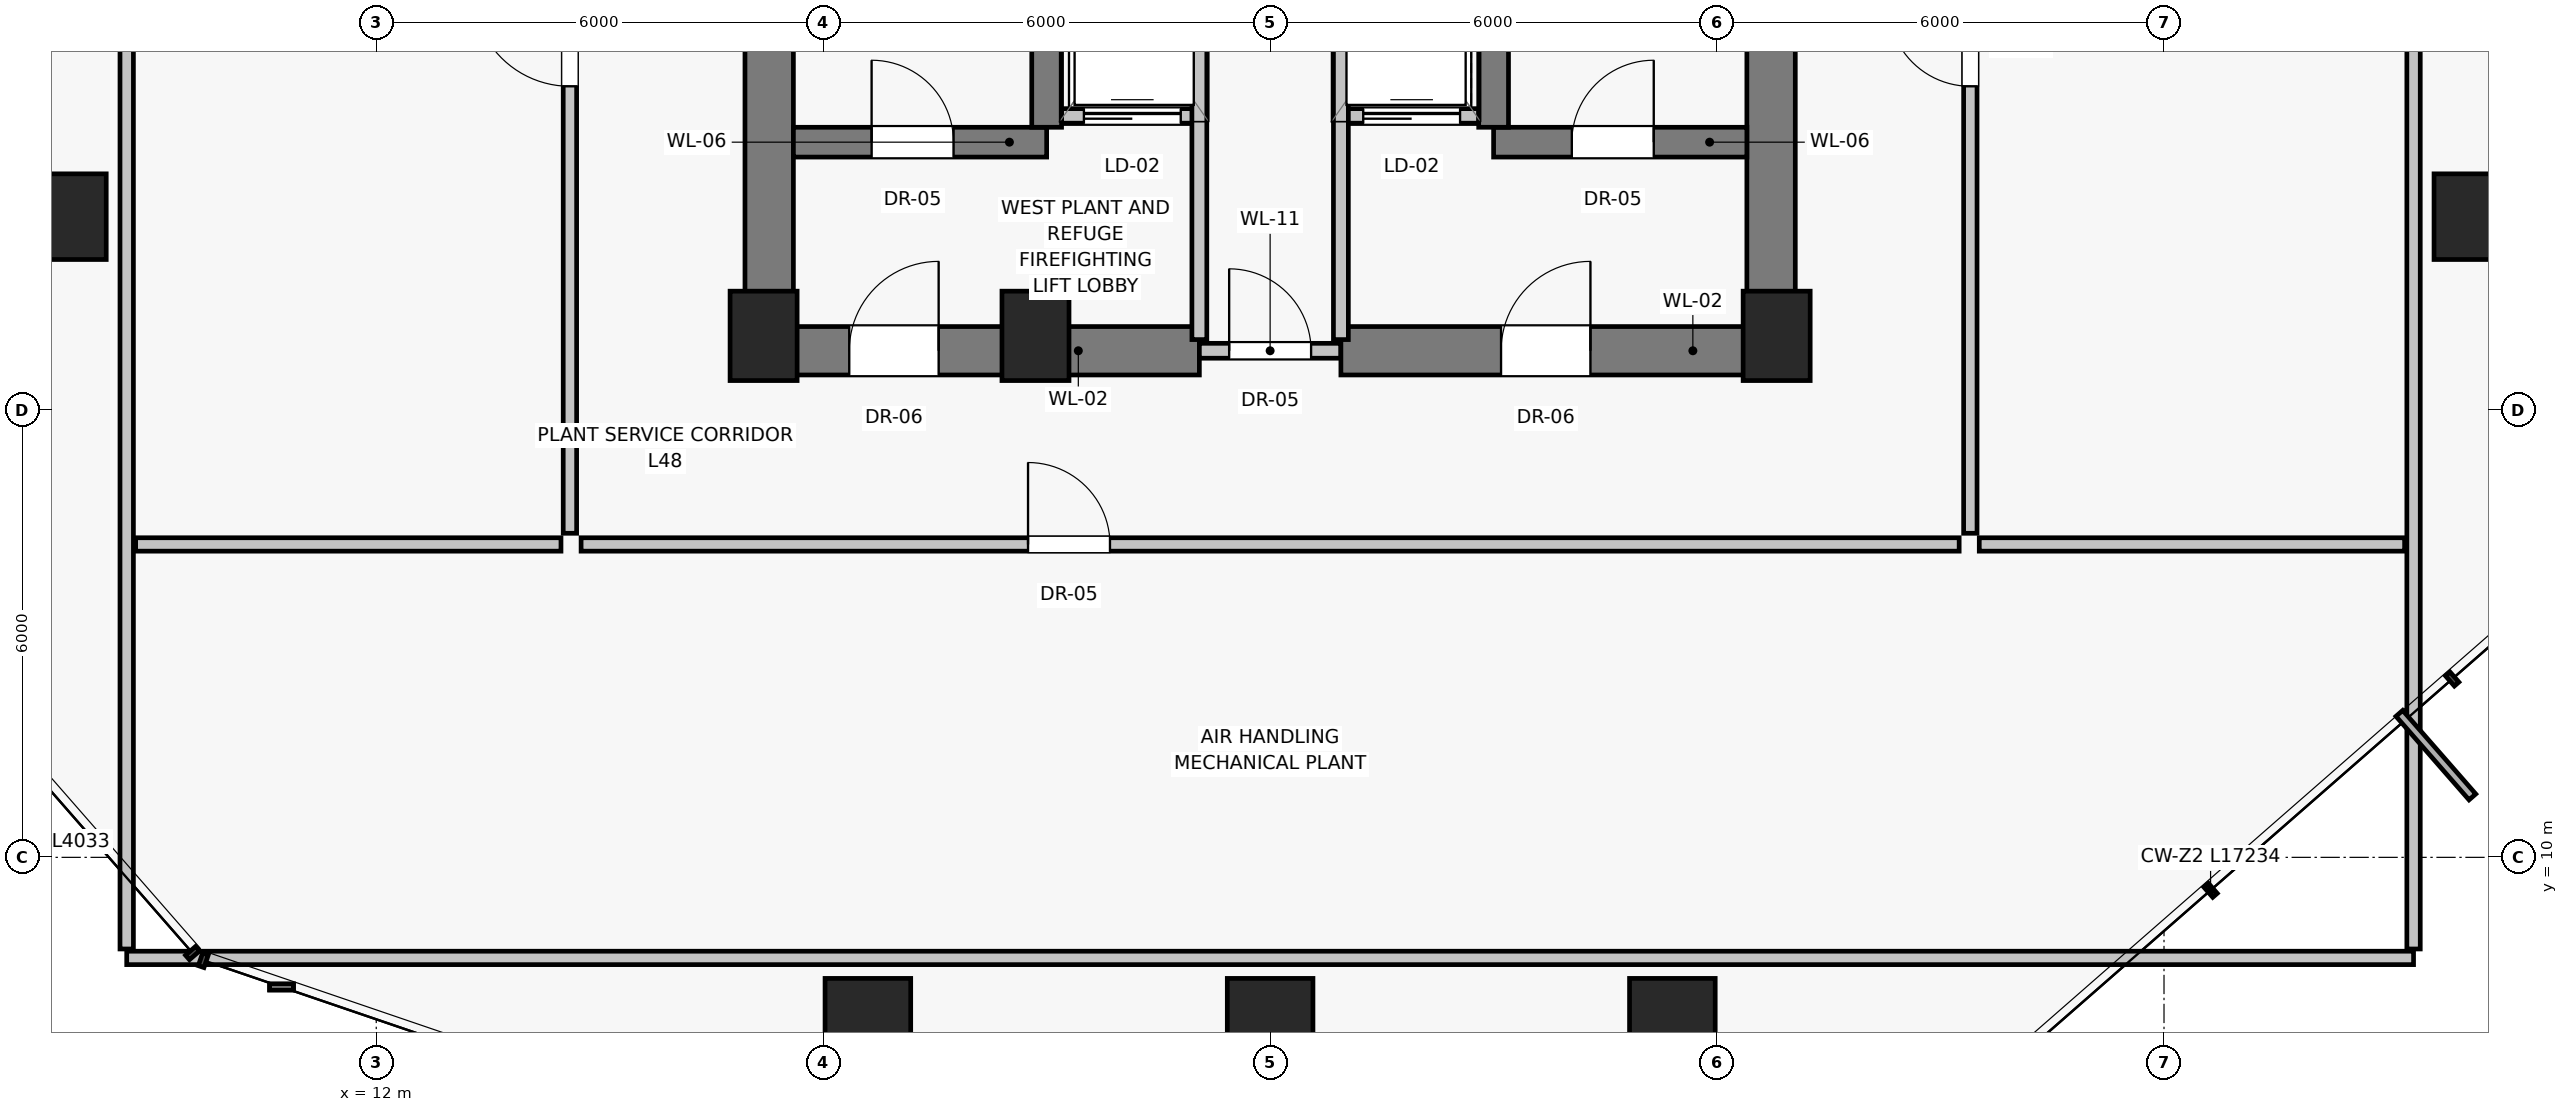
"""IFC4 building model, lengths in metres.
Left out: names, types, materials, properties, quantities, classifications, styles, units other than length and angle.
Written with IfcOpenShell. Run it as: python <this file> out.ifc"""

import sys

from ifc_helpers import new_model, si_unit, direction, frame, frame_2d, origin, origin_2d, place, context, subcontext, project, spatial, rectangle, extrude, source, transform, mapped, element, fill, save


model = new_model("IFC4")
c1 = context("Model", 3, precision=1e-05, world=origin(), true_north=direction((0.0, 1.0)))
c2 = subcontext(c1, "Body", "Model", "MODEL_VIEW")
j1 = project(units=[si_unit("LENGTHUNIT", "METRE"), si_unit("PLANEANGLEUNIT", "RADIAN")], contexts=[c1])
p1 = place(None, origin())
s1 = spatial("IfcSite", under=j1, at=p1, CompositionType="ELEMENT")
p2 = place(p1, origin())
s2 = spatial("IfcBuilding", under=s1, at=p2, CompositionType="ELEMENT")
p3 = place(p2, frame((0.0, 0.0, 169.55)))
s3 = spatial("IfcBuildingStorey", under=s2, at=p3, CompositionType="ELEMENT", Elevation=169.55)
for number, where, z_axis, x_axis in (
    (1, (17.2, 17.0, 0.0), (0.0, 0.0, 1.0), (1.0, 0.0, 0.0)),
    (2, (20.85, 17.0, 0.0), (0.0, 0.0, 1.0), (1.0, 0.0, 0.0)),
    (3, (30.8, 17.0, 0.0), (0.0, 0.0, 1.0), (1.0, 0.0, 0.0)),
):
    element("IfcColumn", number, at=place(p3, frame(where, z_axis=z_axis, x_axis=x_axis)), inside=s3, PredefinedType="PILASTER", context=c2, shape_type="SweptSolid", body=[
        extrude(rectangle(XDim=0.9, YDim=1.2, at=origin_2d()), origin(), (0.0, 0.0, 1.0), 4.8),
    ])
for number, where, z_axis, x_axis in (
    (4, (40.2, 18.6, 0.0), (0.0, 0.0, 1.0), (1.0, 0.0, 0.0)),
    (5, (7.8, 18.6, 0.0), (0.0, 0.0, 1.0), (1.0, 0.0, 0.0)),
    (6, (18.6, 7.8, 0.0), (0.0, 0.0, 1.0), (1.0, 0.0, 0.0)),
    (7, (24.0, 7.8, 0.0), (0.0, 0.0, 1.0), (1.0, 0.0, 0.0)),
    (8, (29.4, 7.8, 0.0), (0.0, 0.0, 1.0), (1.0, 0.0, 0.0)),
):
    element("IfcColumn", number, at=place(p3, frame(where, z_axis=z_axis, x_axis=x_axis)), inside=s3, PredefinedType="COLUMN", context=c2, shape_type="SweptSolid", body=[
        extrude(rectangle(XDim=1.15, YDim=1.15, at=origin_2d()), origin(), (0.0, 0.0, 1.0), 4.8),
    ])
for number, where, z_axis, x_axis in (
    (9, (17.275, 16.8, 0.0), (0.0, 0.0, 1.0), (0.0, 1.0, 0.0)),
    (10, (30.725, 16.8, 0.0), (0.0, 0.0, 1.0), (0.0, 1.0, 0.0)),
):
    element("IfcWall", number, at=place(p3, frame(where, z_axis=z_axis, x_axis=x_axis)), inside=s3, PredefinedType="SHEAR", context=c2, shape_type="SweptSolid", body=[
        extrude(rectangle(XDim=14.2, YDim=0.65, at=frame_2d((7.1, 0.0))), origin(), (0.0, 0.0, 1.0), 4.48),
    ])
p4 = place(p3, frame((17.2, 16.8, 0.0), z_axis=(0.0, 0.0, 1.0), x_axis=(1.0, 0.0, 0.0)))
e11 = element("IfcWall", 11, at=p4, inside=s3, PredefinedType="SHEAR", context=c2, shape_type="SweptSolid", body=[
    extrude(rectangle(XDim=5.85, YDim=0.65, at=frame_2d((2.925, 0.0))), origin(), (0.0, 0.0, 1.0), 4.48),
])
p5 = place(p4, frame((1.15, 0.0, 0.0)))
e12 = element("IfcOpeningElement", 12, at=p5, cuts=e11, PredefinedType="OPENING", context=c2, shape_type="SweptSolid", body=[
    extrude(rectangle(XDim=1.2, YDim=2.03, at=frame_2d((0.6, 1.015))), frame((0.0, 0.335, 0.0), z_axis=(0.0, -1.0, 0.0), x_axis=(1.0, 0.0, 0.0)), (0.0, 0.0, 1.0), 0.67),
])
p6 = place(p3, frame((23.05, 16.8, 0.0), z_axis=(0.0, 0.0, 1.0), x_axis=(1.0, 0.0, 0.0)))
e13 = element("IfcWall", 13, at=p6, inside=s3, PredefinedType="SOLIDWALL", context=c2, shape_type="SweptSolid", body=[
    extrude(rectangle(XDim=1.9, YDim=0.2, at=frame_2d((0.95, 0.0))), origin(), (0.0, 0.0, 1.0), 2.28),
])
p7 = place(p6, frame((0.4, 0.0, 0.0)))
e14 = element("IfcOpeningElement", 14, at=p7, cuts=e13, PredefinedType="OPENING", context=c2, shape_type="SweptSolid", body=[
    extrude(rectangle(XDim=1.1, YDim=2.03, at=frame_2d((0.55, 1.015))), frame((0.0, 0.11, 0.0), z_axis=(0.0, -1.0, 0.0), x_axis=(1.0, 0.0, 0.0)), (0.0, 0.0, 1.0), 0.22),
])
p8 = place(p3, frame((24.95, 16.8, 0.0), z_axis=(0.0, 0.0, 1.0), x_axis=(1.0, 0.0, 0.0)))
e15 = element("IfcWall", 15, at=p8, inside=s3, PredefinedType="SHEAR", context=c2, shape_type="SweptSolid", body=[
    extrude(rectangle(XDim=5.85, YDim=0.65, at=frame_2d((2.925, 0.0))), origin(), (0.0, 0.0, 1.0), 4.48),
])
p9 = place(p8, frame((2.15, 0.0, 0.0)))
e16 = element("IfcOpeningElement", 16, at=p9, cuts=e15, PredefinedType="OPENING", context=c2, shape_type="SweptSolid", body=[
    extrude(rectangle(XDim=1.2, YDim=2.03, at=frame_2d((0.6, 1.015))), frame((0.0, 0.335, 0.0), z_axis=(0.0, -1.0, 0.0), x_axis=(1.0, 0.0, 0.0)), (0.0, 0.0, 1.0), 0.67),
])
p10 = place(p3, frame((17.6, 19.6, 0.0), z_axis=(0.0, 0.0, 1.0), x_axis=(1.0, 0.0, 0.0)))
e17 = element("IfcWall", 17, at=p10, inside=s3, PredefinedType="SHEAR", context=c2, shape_type="SweptSolid", body=[
    extrude(rectangle(XDim=3.4, YDim=0.4, at=frame_2d((1.7, 0.0))), origin(), (0.0, 0.0, 1.0), 4.48),
])
p11 = place(p10, frame((1.05, 0.0, 0.0)))
e18 = element("IfcOpeningElement", 18, at=p11, cuts=e17, PredefinedType="OPENING", context=c2, shape_type="SweptSolid", body=[
    extrude(rectangle(XDim=1.1, YDim=2.03, at=frame_2d((0.55, 1.015))), frame((0.0, 0.21, 0.0), z_axis=(0.0, -1.0, 0.0), x_axis=(1.0, 0.0, 0.0)), (0.0, 0.0, 1.0), 0.42),
])
p12 = place(p3, frame((21.2, 19.95, 0.0), z_axis=(0.0, 0.0, 1.0), x_axis=(1.0, 0.0, 0.0)))
e19 = element("IfcWall", 19, at=p12, inside=s3, PredefinedType="SOLIDWALL", context=c2, shape_type="SweptSolid", body=[
    extrude(rectangle(XDim=1.85, YDim=0.2, at=frame_2d((0.925, 0.0))), origin(), (0.0, 0.0, 1.0), 4.48),
])
p13 = place(p12, frame((0.3, 0.0, 0.0)))
e20 = element("IfcOpeningElement", 20, at=p13, cuts=e19, PredefinedType="OPENING", context=c2, shape_type="SweptSolid", body=[
    extrude(rectangle(XDim=1.3, YDim=2.25, at=frame_2d((0.65, 1.125))), frame((0.0, 0.11, 0.0), z_axis=(0.0, -1.0, 0.0), x_axis=(1.0, 0.0, 0.0)), (0.0, 0.0, 1.0), 0.22),
])
p14 = place(p3, frame((24.95, 19.95, 0.0), z_axis=(0.0, 0.0, 1.0), x_axis=(1.0, 0.0, 0.0)))
e21 = element("IfcWall", 21, at=p14, inside=s3, PredefinedType="SOLIDWALL", context=c2, shape_type="SweptSolid", body=[
    extrude(rectangle(XDim=1.85, YDim=0.2, at=frame_2d((0.925, 0.0))), origin(), (0.0, 0.0, 1.0), 4.48),
])
p15 = place(p14, frame((0.3, 0.0, 0.0)))
e22 = element("IfcOpeningElement", 22, at=p15, cuts=e21, PredefinedType="OPENING", context=c2, shape_type="SweptSolid", body=[
    extrude(rectangle(XDim=1.3, YDim=2.25, at=frame_2d((0.65, 1.125))), frame((0.0, 0.11, 0.0), z_axis=(0.0, -1.0, 0.0), x_axis=(1.0, 0.0, 0.0)), (0.0, 0.0, 1.0), 0.22),
])
p16 = place(p3, frame((27.0, 19.6, 0.0), z_axis=(0.0, 0.0, 1.0), x_axis=(1.0, 0.0, 0.0)))
e23 = element("IfcWall", 23, at=p16, inside=s3, PredefinedType="SHEAR", context=c2, shape_type="SweptSolid", body=[
    extrude(rectangle(XDim=3.4, YDim=0.4, at=frame_2d((1.7, 0.0))), origin(), (0.0, 0.0, 1.0), 4.48),
])
p17 = place(p16, frame((1.05, 0.0, 0.0)))
e24 = element("IfcOpeningElement", 24, at=p17, cuts=e23, PredefinedType="OPENING", context=c2, shape_type="SweptSolid", body=[
    extrude(rectangle(XDim=1.1, YDim=2.03, at=frame_2d((0.55, 1.015))), frame((0.0, 0.21, 0.0), z_axis=(0.0, -1.0, 0.0), x_axis=(1.0, 0.0, 0.0)), (0.0, 0.0, 1.0), 0.42),
])
for number, where, z_axis, x_axis in (
    (25, (21.0, 19.8, 0.0), (0.0, 0.0, 1.0), (0.0, 1.0, 0.0)),
    (26, (27.0, 19.8, 0.0), (0.0, 0.0, 1.0), (0.0, 1.0, 0.0)),
):
    element("IfcWall", number, at=place(p3, frame(where, z_axis=z_axis, x_axis=x_axis)), inside=s3, PredefinedType="SHEAR", context=c2, shape_type="SweptSolid", body=[
        extrude(rectangle(XDim=8.8, YDim=0.4, at=frame_2d((4.4, 0.0))), origin(), (0.0, 0.0, 1.0), 4.48),
    ])
for number, where, z_axis, x_axis in (
    (27, (23.05, 16.95, 0.0), (0.0, 0.0, 1.0), (0.0, 1.0, 0.0)),
    (28, (24.95, 16.95, 0.0), (0.0, 0.0, 1.0), (0.0, 1.0, 0.0)),
):
    element("IfcWall", number, at=place(p3, frame(where, z_axis=z_axis, x_axis=x_axis)), inside=s3, PredefinedType="SOLIDWALL", context=c2, shape_type="SweptSolid", body=[
        extrude(rectangle(XDim=5.6, YDim=0.2, at=frame_2d((2.8, 0.0))), origin(), (0.0, 0.0, 1.0), 2.28),
    ])
p18 = place(p3, frame((14.75, 14.2, 0.0), z_axis=(0.0, 0.0, 1.0), x_axis=(1.0, 0.0, 0.0)))
e29 = element("IfcWall", 29, at=p18, inside=s3, PredefinedType="PARTITIONING", context=c2, shape_type="SweptSolid", body=[
    extrude(rectangle(XDim=18.5, YDim=0.18, at=frame_2d((9.25, 0.0))), origin(), (0.0, 0.0, 1.0), 4.48),
])
p19 = place(p18, frame((6.0, 0.0, 0.0)))
e30 = element("IfcOpeningElement", 30, at=p19, cuts=e29, PredefinedType="OPENING", context=c2, shape_type="SweptSolid", body=[
    extrude(rectangle(XDim=1.1, YDim=2.03, at=frame_2d((0.55, 1.015))), frame((0.0, 0.1, 0.0), z_axis=(0.0, -1.0, 0.0), x_axis=(1.0, 0.0, 0.0)), (0.0, 0.0, 1.0), 0.2),
])
p20 = place(p3, frame((33.4, 14.35, 0.0), z_axis=(0.0, 0.0, 1.0), x_axis=(0.0, 1.0, 0.0)))
e31 = element("IfcWall", 31, at=p20, inside=s3, PredefinedType="PARTITIONING", context=c2, shape_type="SweptSolid", body=[
    extrude(rectangle(XDim=19.1, YDim=0.18, at=frame_2d((9.55, 0.0))), origin(), (0.0, 0.0, 1.0), 4.48),
])
p21 = place(p20, frame((6.0, 0.0, 0.0)))
e32 = element("IfcOpeningElement", 32, at=p21, cuts=e31, PredefinedType="OPENING", context=c2, shape_type="SweptSolid", body=[
    extrude(rectangle(XDim=1.1, YDim=2.03, at=frame_2d((0.55, 1.015))), frame((0.0, 0.1, 0.0), z_axis=(0.0, -1.0, 0.0), x_axis=(1.0, 0.0, 0.0)), (0.0, 0.0, 1.0), 0.2),
])
p22 = place(p3, frame((14.6, 14.35, 0.0), z_axis=(0.0, 0.0, 1.0), x_axis=(0.0, 1.0, 0.0)))
e33 = element("IfcWall", 33, at=p22, inside=s3, PredefinedType="PARTITIONING", context=c2, shape_type="SweptSolid", body=[
    extrude(rectangle(XDim=19.1, YDim=0.18, at=frame_2d((9.55, 0.0))), origin(), (0.0, 0.0, 1.0), 4.48),
])
p23 = place(p22, frame((6.0, 0.0, 0.0)))
e34 = element("IfcOpeningElement", 34, at=p23, cuts=e33, PredefinedType="OPENING", context=c2, shape_type="SweptSolid", body=[
    extrude(rectangle(XDim=1.3, YDim=2.3, at=frame_2d((0.65, 1.15))), frame((0.0, 0.1, 0.0), z_axis=(0.0, -1.0, 0.0), x_axis=(1.0, 0.0, 0.0)), (0.0, 0.0, 1.0), 0.2),
])
p24 = place(p3, frame((8.65, 8.65, 0.0), z_axis=(0.0, 0.0, 1.0), x_axis=(1.0, 0.0, 0.0)))
e35 = element("IfcWall", 35, at=p24, inside=s3, PredefinedType="PARTITIONING", context=c2, shape_type="SweptSolid", body=[
    extrude(rectangle(XDim=30.7, YDim=0.18, at=frame_2d((15.35, 0.0))), origin(), (0.0, 0.0, 1.0), 4.48),
])
for number, where, z_axis, x_axis in (
    (36, (8.65, 8.77, 0.0), (0.0, 0.0, 1.0), (0.0, 1.0, 0.0)),
    (37, (39.35, 8.77, 0.0), (0.0, 0.0, 1.0), (0.0, 1.0, 0.0)),
):
    element("IfcWall", number, at=place(p3, frame(where, z_axis=z_axis, x_axis=x_axis)), inside=s3, PredefinedType="PARTITIONING", context=c2, shape_type="SweptSolid", body=[
        extrude(rectangle(XDim=30.46, YDim=0.18, at=frame_2d((15.23, 0.0))), origin(), (0.0, 0.0, 1.0), 2.28),
    ])
for number, where, z_axis, x_axis in (
    (38, (8.77, 14.2, 0.0), (0.0, 0.0, 1.0), (1.0, 0.0, 0.0)),
    (39, (33.52, 14.2, 0.0), (0.0, 0.0, 1.0), (1.0, 0.0, 0.0)),
):
    element("IfcWall", number, at=place(p3, frame(where, z_axis=z_axis, x_axis=x_axis)), inside=s3, PredefinedType="PARTITIONING", context=c2, shape_type="SweptSolid", body=[
        extrude(rectangle(XDim=5.71, YDim=0.18, at=frame_2d((2.855, 0.0))), origin(), (0.0, 0.0, 1.0), 4.48),
    ])
m1 = source(origin(), c2, "Body", "SweptSolid", [
    extrude(rectangle(XDim=1.2, YDim=2.03, at=frame_2d((0.6, 1.015))), frame((0.0, 0.025, 0.0), z_axis=(0.0, -1.0, 0.0), x_axis=(1.0, 0.0, 0.0)), (0.0, 0.0, 1.0), 0.05),
])
p25 = place(p5, origin())
e40 = element("IfcDoor", 40, at=p25, inside=s3, OperationType="SINGLE_SWING_RIGHT", PredefinedType="DOOR", context=c2, shape_type="MappedRepresentation", body=[
    mapped(m1, transform((0.0, 0.0, 0.0), scale=1.0)),
])
fill(e12, e40)
m2 = source(origin(), c2, "Body", "SweptSolid", [
    extrude(rectangle(XDim=1.1, YDim=2.03, at=frame_2d((0.55, 1.015))), frame((0.0, 0.025, 0.0), z_axis=(0.0, -1.0, 0.0), x_axis=(1.0, 0.0, 0.0)), (0.0, 0.0, 1.0), 0.05),
])
p26 = place(p7, origin())
e41 = element("IfcDoor", 41, at=p26, inside=s3, OperationType="SINGLE_SWING_LEFT", PredefinedType="DOOR", context=c2, shape_type="MappedRepresentation", body=[
    mapped(m2, transform((0.0, 0.0, 0.0), scale=1.0)),
])
fill(e14, e41)
p27 = place(p9, origin())
e42 = element("IfcDoor", 42, at=p27, inside=s3, OperationType="SINGLE_SWING_RIGHT", PredefinedType="DOOR", context=c2, shape_type="MappedRepresentation", body=[
    mapped(m1, transform((0.0, 0.0, 0.0), scale=1.0)),
])
fill(e16, e42)
p28 = place(p11, origin())
e43 = element("IfcDoor", 43, at=p28, inside=s3, OperationType="SINGLE_SWING_LEFT", PredefinedType="DOOR", context=c2, shape_type="MappedRepresentation", body=[
    mapped(m2, transform((0.0, 0.0, 0.0), scale=1.0)),
])
fill(e18, e43)
m3 = source(origin(), c2, "Body", "SweptSolid", [
    extrude(rectangle(XDim=1.3, YDim=2.25, at=frame_2d((0.65, 1.125))), frame((0.0, 0.025, 0.0), z_axis=(0.0, -1.0, 0.0), x_axis=(1.0, 0.0, 0.0)), (0.0, 0.0, 1.0), 0.05),
])
p29 = place(p13, origin())
e44 = element("IfcDoor", 44, at=p29, inside=s3, OperationType="SLIDING_TO_LEFT", PredefinedType="DOOR", context=c2, shape_type="MappedRepresentation", body=[
    mapped(m3, transform((0.0, 0.0, 0.0), scale=1.0)),
])
fill(e20, e44)
p30 = place(p15, origin())
e45 = element("IfcDoor", 45, at=p30, inside=s3, OperationType="SLIDING_TO_LEFT", PredefinedType="DOOR", context=c2, shape_type="MappedRepresentation", body=[
    mapped(m3, transform((0.0, 0.0, 0.0), scale=1.0)),
])
fill(e22, e45)
p31 = place(p17, origin())
e46 = element("IfcDoor", 46, at=p31, inside=s3, OperationType="SINGLE_SWING_RIGHT", PredefinedType="DOOR", context=c2, shape_type="MappedRepresentation", body=[
    mapped(m2, transform((0.0, 0.0, 0.0), scale=1.0)),
])
fill(e24, e46)
p32 = place(p19, origin())
e47 = element("IfcDoor", 47, at=p32, inside=s3, OperationType="SINGLE_SWING_LEFT", PredefinedType="DOOR", context=c2, shape_type="MappedRepresentation", body=[
    mapped(m2, transform((0.0, 0.0, 0.0), scale=1.0)),
])
fill(e30, e47)
p33 = place(p21, origin())
e48 = element("IfcDoor", 48, at=p33, inside=s3, OperationType="SINGLE_SWING_RIGHT", PredefinedType="DOOR", context=c2, shape_type="MappedRepresentation", body=[
    mapped(m2, transform((0.0, 0.0, 0.0), scale=1.0)),
])
fill(e32, e48)
m4 = source(origin(), c2, "Body", "SweptSolid", [
    extrude(rectangle(XDim=1.3, YDim=2.3, at=frame_2d((0.65, 1.15))), frame((0.0, 0.025, 0.0), z_axis=(0.0, -1.0, 0.0), x_axis=(1.0, 0.0, 0.0)), (0.0, 0.0, 1.0), 0.05),
])
p34 = place(p23, origin())
e49 = element("IfcDoor", 49, at=p34, inside=s3, OperationType="SINGLE_SWING_RIGHT", PredefinedType="DOOR", context=c2, shape_type="MappedRepresentation", body=[
    mapped(m4, transform((0.0, 0.0, 0.0), scale=1.0)),
])
fill(e34, e49)
save(model, sys.argv[1])
